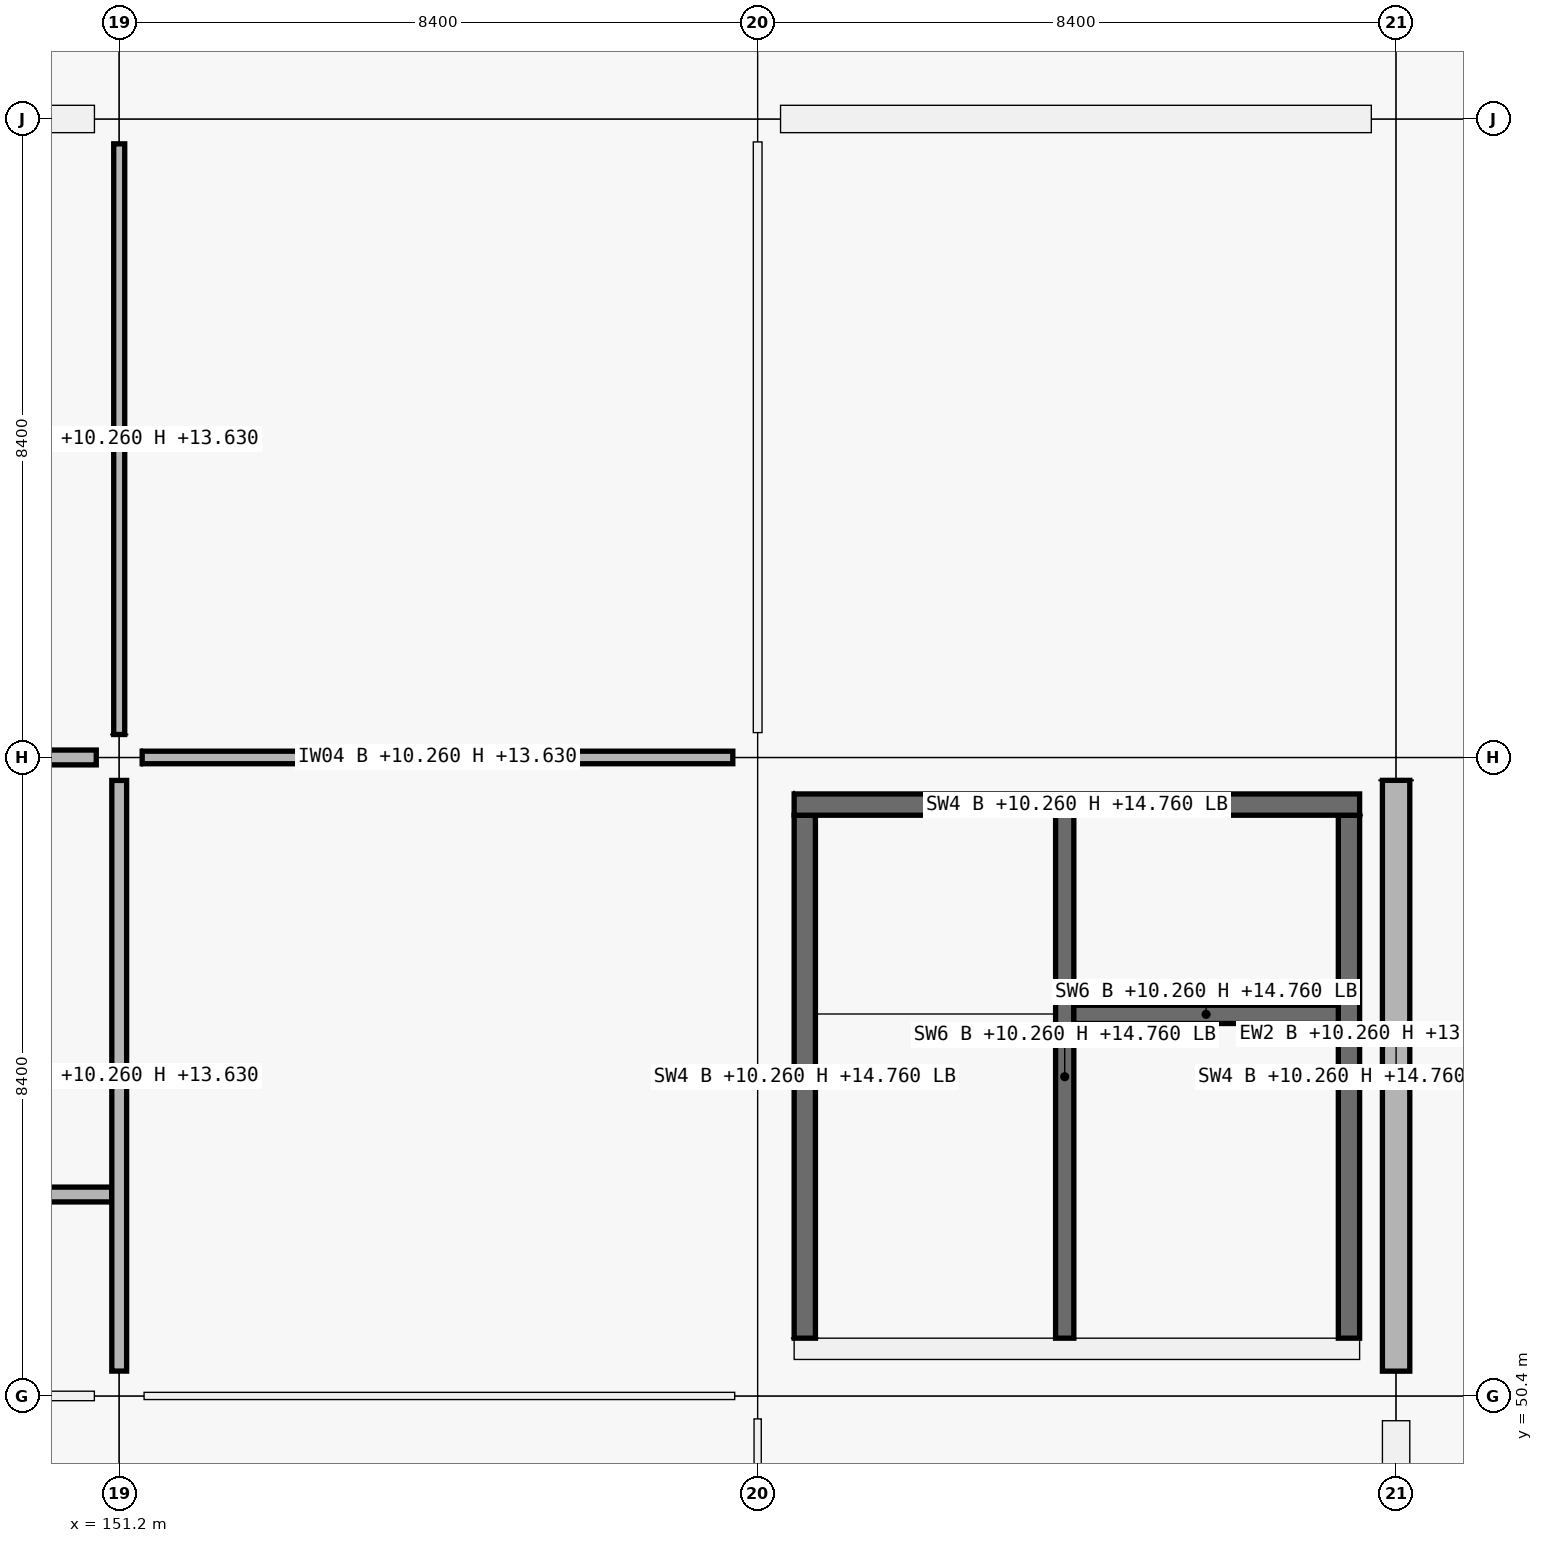
"""IFC4 building model, lengths in metres.
Left out: names, types, materials, properties, quantities, classifications, styles, units other than length and angle.
Written with IfcOpenShell. Run it as: python <this file> out.ifc"""

import sys

from ifc_helpers import new_model, si_unit, direction, frame, frame_2d, origin, origin_2d, place, context, subcontext, project, spatial, rectangle, extrude, element, fill, save


model = new_model("IFC4")
c1 = context("Model", 3, precision=1e-05, world=origin(), true_north=direction((0.0, 1.0)))
c2 = subcontext(c1, "Body", "Model", "MODEL_VIEW")
j1 = project(units=[si_unit("LENGTHUNIT", "METRE"), si_unit("PLANEANGLEUNIT", "RADIAN")], contexts=[c1])
p1 = place(None, origin())
s1 = spatial("IfcSite", under=j1, at=p1, CompositionType="ELEMENT")
p2 = place(p1, origin())
s2 = spatial("IfcBuilding", under=s1, at=p2, CompositionType="ELEMENT")
p3 = place(p2, frame((0.0, 0.0, 10.26)))
s3 = spatial("IfcBuildingStorey", under=s2, at=p3, CompositionType="ELEMENT", Elevation=10.26)
p4 = place(p3, frame((151.2, 50.4, 0.0), z_axis=(0.0, 0.0, 1.0), x_axis=(1.0, 0.0, 0.0)))
e1 = element("IfcColumn", 1, at=p4, inside=s3, PredefinedType="COLUMN", context=c2, shape_type="SweptSolid", body=[
    extrude(rectangle(XDim=0.65, YDim=0.65, at=origin_2d()), origin(), (0.0, 0.0, 1.0), 4.5),
])
p5 = place(p3, frame((151.2, 58.8, 0.0), z_axis=(0.0, 0.0, 1.0), x_axis=(1.0, 0.0, 0.0)))
e2 = element("IfcColumn", 2, at=p5, inside=s3, PredefinedType="COLUMN", context=c2, shape_type="SweptSolid", body=[
    extrude(rectangle(XDim=0.6, YDim=0.6, at=origin_2d()), origin(), (0.0, 0.0, 1.0), 4.5),
])
p6 = place(p3, frame((151.2, 67.2, 0.0), z_axis=(0.0, 0.0, 1.0), x_axis=(1.0, 0.0, 0.0)))
e3 = element("IfcColumn", 3, at=p6, inside=s3, PredefinedType="COLUMN", context=c2, shape_type="SweptSolid", body=[
    extrude(rectangle(XDim=0.65, YDim=0.65, at=origin_2d()), origin(), (0.0, 0.0, 1.0), 4.5),
])
p7 = place(p3, frame((159.6, 50.4, 0.0), z_axis=(0.0, 0.0, 1.0), x_axis=(1.0, 0.0, 0.0)))
e4 = element("IfcColumn", 4, at=p7, inside=s3, PredefinedType="COLUMN", context=c2, shape_type="SweptSolid", body=[
    extrude(rectangle(XDim=0.6, YDim=0.6, at=origin_2d()), origin(), (0.0, 0.0, 1.0), 4.5),
])
p8 = place(p3, frame((159.6, 58.8, 0.0), z_axis=(0.0, 0.0, 1.0), x_axis=(1.0, 0.0, 0.0)))
e5 = element("IfcColumn", 5, at=p8, inside=s3, PredefinedType="COLUMN", context=c2, shape_type="SweptSolid", body=[
    extrude(rectangle(XDim=0.65, YDim=0.65, at=origin_2d()), origin(), (0.0, 0.0, 1.0), 4.5),
])
p9 = place(p3, frame((159.6, 67.2, 0.0), z_axis=(0.0, 0.0, 1.0), x_axis=(1.0, 0.0, 0.0)))
e6 = element("IfcColumn", 6, at=p9, inside=s3, PredefinedType="COLUMN", context=c2, shape_type="SweptSolid", body=[
    extrude(rectangle(XDim=0.6, YDim=0.6, at=origin_2d()), origin(), (0.0, 0.0, 1.0), 4.5),
])
p10 = place(p3, frame((168.0, 50.4, 0.0), z_axis=(0.0, 0.0, 1.0), x_axis=(1.0, 0.0, 0.0)))
e7 = element("IfcColumn", 7, at=p10, inside=s3, PredefinedType="COLUMN", context=c2, shape_type="SweptSolid", body=[
    extrude(rectangle(XDim=0.65, YDim=0.65, at=origin_2d()), origin(), (0.0, 0.0, 1.0), 4.5),
])
p11 = place(p3, frame((168.0, 58.8, 0.0), z_axis=(0.0, 0.0, 1.0), x_axis=(1.0, 0.0, 0.0)))
e8 = element("IfcColumn", 8, at=p11, inside=s3, PredefinedType="COLUMN", context=c2, shape_type="SweptSolid", body=[
    extrude(rectangle(XDim=0.6, YDim=0.6, at=origin_2d()), origin(), (0.0, 0.0, 1.0), 4.5),
])
p12 = place(p3, frame((168.0, 67.2, 0.0), z_axis=(0.0, 0.0, 1.0), x_axis=(1.0, 0.0, 0.0)))
e9 = element("IfcColumn", 9, at=p12, inside=s3, PredefinedType="COLUMN", context=c2, shape_type="SweptSolid", body=[
    extrude(rectangle(XDim=0.65, YDim=0.65, at=origin_2d()), origin(), (0.0, 0.0, 1.0), 4.5),
])
p13 = place(p3, frame((143.101, 67.2, 0.0), z_axis=(0.0, 0.0, 1.0), x_axis=(1.0, 0.0, 0.0)))
e10 = element("IfcWall", 10, at=p13, inside=s3, PredefinedType="SOLIDWALL", context=c2, shape_type="SweptSolid", body=[
    extrude(rectangle(XDim=7.773, YDim=0.36, at=frame_2d((3.886, 0.0))), origin(), (0.0, 0.0, 1.0), 3.54),
])
p14 = place(p13, frame((2.686, 0.0, 0.9)))
e11 = element("IfcOpeningElement", 11, at=p14, cuts=e10, PredefinedType="OPENING", context=c2, shape_type="SweptSolid", body=[
    extrude(rectangle(XDim=2.4, YDim=1.8, at=frame_2d((1.2, 0.9))), frame((0.0, 0.18, 0.0), z_axis=(0.0, -1.0, 0.0), x_axis=(1.0, 0.0, 0.0)), (0.0, 0.0, 1.0), 0.36),
])
p15 = place(p3, frame((168.0, 50.074, 0.0), z_axis=(0.0, 0.0, 1.0), x_axis=(0.0, -1.0, 0.0)))
e12 = element("IfcWall", 12, at=p15, inside=s3, PredefinedType="SOLIDWALL", context=c2, shape_type="SweptSolid", body=[
    extrude(rectangle(XDim=7.773, YDim=0.36, at=frame_2d((3.886, 0.0))), origin(), (0.0, 0.0, 1.0), 3.54),
])
p16 = place(p15, frame((2.587, 0.0, 0.9)))
e13 = element("IfcOpeningElement", 13, at=p16, cuts=e12, PredefinedType="OPENING", context=c2, shape_type="SweptSolid", body=[
    extrude(rectangle(XDim=2.6, YDim=2.1, at=frame_2d((1.3, 1.05))), frame((0.0, 0.18, 0.0), z_axis=(0.0, -1.0, 0.0), x_axis=(1.0, 0.0, 0.0)), (0.0, 0.0, 1.0), 0.36),
])
p17 = place(p3, frame((168.0, 58.499, 0.0), z_axis=(0.0, 0.0, 1.0), x_axis=(0.0, -1.0, 0.0)))
e14 = element("IfcWall", 14, at=p17, inside=s3, PredefinedType="SOLIDWALL", context=c2, shape_type="SweptSolid", body=[
    extrude(rectangle(XDim=7.773, YDim=0.36, at=frame_2d((3.886, 0.0))), origin(), (0.0, 0.0, 1.0), 3.54),
])
p18 = place(p3, frame((159.901, 67.2, 0.0), z_axis=(0.0, 0.0, 1.0), x_axis=(1.0, 0.0, 0.0)))
e15 = element("IfcWall", 15, at=p18, inside=s3, PredefinedType="SOLIDWALL", context=c2, shape_type="SweptSolid", body=[
    extrude(rectangle(XDim=7.773, YDim=0.36, at=frame_2d((3.887, 0.0))), origin(), (0.0, 0.0, 1.0), 3.54),
])
p19 = place(p18, frame((3.286, 0.0, 0.9)))
e16 = element("IfcOpeningElement", 16, at=p19, cuts=e15, PredefinedType="OPENING", context=c2, shape_type="SweptSolid", body=[
    extrude(rectangle(XDim=1.2, YDim=2.1, at=frame_2d((0.6, 1.05))), frame((0.0, 0.18, 0.0), z_axis=(0.0, -1.0, 0.0), x_axis=(1.0, 0.0, 0.0)), (0.0, 0.0, 1.0), 0.36),
])
p20 = place(p3, frame((167.52, 51.02, 0.0), z_axis=(0.0, 0.0, 1.0), x_axis=(-1.0, 0.0, 0.0)))
e17 = element("IfcWall", 17, at=p20, inside=s3, PredefinedType="SHEAR", context=c2, shape_type="SweptSolid", body=[
    extrude(rectangle(XDim=7.44, YDim=0.28, at=frame_2d((3.72, 0.0))), origin(), (0.0, 0.0, 1.0), 4.5),
])
p21 = place(p20, frame((1.28, 0.0, 0.0)))
e18 = element("IfcOpeningElement", 18, at=p21, cuts=e17, PredefinedType="OPENING", context=c2, shape_type="SweptSolid", body=[
    extrude(rectangle(XDim=1.5, YDim=2.15, at=frame_2d((0.75, 1.075))), frame((0.0, 0.14, 0.0), z_axis=(0.0, -1.0, 0.0), x_axis=(1.0, 0.0, 0.0)), (0.0, 0.0, 1.0), 0.28),
])
p22 = place(p3, frame((160.22, 51.16, 0.0), z_axis=(0.0, 0.0, 1.0), x_axis=(0.0, 1.0, 0.0)))
e19 = element("IfcWall", 19, at=p22, inside=s3, PredefinedType="SHEAR", context=c2, shape_type="SweptSolid", body=[
    extrude(rectangle(XDim=6.88, YDim=0.28, at=frame_2d((3.44, 0.0))), origin(), (0.0, 0.0, 1.0), 4.5),
])
p23 = place(p3, frame((160.08, 58.18, 0.0), z_axis=(0.0, 0.0, 1.0), x_axis=(1.0, 0.0, 0.0)))
e20 = element("IfcWall", 20, at=p23, inside=s3, PredefinedType="SHEAR", context=c2, shape_type="SweptSolid", body=[
    extrude(rectangle(XDim=7.44, YDim=0.28, at=frame_2d((3.72, 0.0))), origin(), (0.0, 0.0, 1.0), 4.5),
])
p24 = place(p3, frame((167.38, 58.04, 0.0), z_axis=(0.0, 0.0, 1.0), x_axis=(0.0, -1.0, 0.0)))
e21 = element("IfcWall", 21, at=p24, inside=s3, PredefinedType="SHEAR", context=c2, shape_type="SweptSolid", body=[
    extrude(rectangle(XDim=6.88, YDim=0.28, at=frame_2d((3.44, 0.0))), origin(), (0.0, 0.0, 1.0), 4.5),
])
p25 = place(p3, frame((163.64, 51.16, 0.0), z_axis=(0.0, 0.0, 1.0), x_axis=(0.0, 1.0, 0.0)))
e22 = element("IfcWall", 22, at=p25, inside=s3, PredefinedType="SHEAR", context=c2, shape_type="SweptSolid", body=[
    extrude(rectangle(XDim=6.88, YDim=0.24, at=frame_2d((3.44, 0.0))), origin(), (0.0, 0.0, 1.0), 4.5),
])
p26 = place(p25, frame((0.12, 0.0, 0.0)))
e23 = element("IfcOpeningElement", 23, at=p26, cuts=e22, PredefinedType="OPENING", context=c2, shape_type="SweptSolid", body=[
    extrude(rectangle(XDim=1.0, YDim=2.15, at=frame_2d((0.5, 1.075))), frame((0.0, 0.12, 0.0), z_axis=(0.0, -1.0, 0.0), x_axis=(1.0, 0.0, 0.0)), (0.0, 0.0, 1.0), 0.24),
])
p27 = place(p3, frame((163.76, 55.42, 0.0), z_axis=(0.0, 0.0, 1.0), x_axis=(1.0, 0.0, 0.0)))
e24 = element("IfcWall", 24, at=p27, inside=s3, PredefinedType="SHEAR", context=c2, shape_type="SweptSolid", body=[
    extrude(rectangle(XDim=3.48, YDim=0.24, at=frame_2d((1.74, 0.0))), origin(), (0.0, 0.0, 1.0), 4.5),
])
p28 = place(p27, frame((1.09, 0.0, 0.0)))
e25 = element("IfcOpeningElement", 25, at=p28, cuts=e24, PredefinedType="OPENING", context=c2, shape_type="SweptSolid", body=[
    extrude(rectangle(XDim=1.3, YDim=2.25, at=frame_2d((0.65, 1.125))), frame((0.0, 0.12, 0.0), z_axis=(0.0, -1.0, 0.0), x_axis=(1.0, 0.0, 0.0)), (0.0, 0.0, 1.0), 0.24),
])
p29 = place(p3, frame((143.102, 50.4, 0.0), z_axis=(0.0, 0.0, 1.0), x_axis=(1.0, 0.0, 0.0)))
e26 = element("IfcWall", 26, at=p29, inside=s3, PredefinedType="PARTITIONING", context=c2, shape_type="SweptSolid", body=[
    extrude(rectangle(XDim=7.771, YDim=0.125, at=frame_2d((3.885, 0.0))), origin(), (0.0, 0.0, 1.0), 3.37),
])
p30 = place(p3, frame((143.127, 58.8, 0.0), z_axis=(0.0, 0.0, 1.0), x_axis=(1.0, 0.0, 0.0)))
e27 = element("IfcWall", 27, at=p30, inside=s3, PredefinedType="PARTITIONING", context=c2, shape_type="SweptSolid", body=[
    extrude(rectangle(XDim=7.771, YDim=0.195, at=frame_2d((3.885, 0.0))), origin(), (0.0, 0.0, 1.0), 3.37),
])
p31 = place(p3, frame((151.527, 50.4, 0.0), z_axis=(0.0, 0.0, 1.0), x_axis=(1.0, 0.0, 0.0)))
e28 = element("IfcWall", 28, at=p31, inside=s3, PredefinedType="PARTITIONING", context=c2, shape_type="SweptSolid", body=[
    extrude(rectangle(XDim=7.771, YDim=0.095, at=frame_2d((3.885, 0.0))), origin(), (0.0, 0.0, 1.0), 3.37),
])
p32 = place(p31, frame((3.405, 0.0, 0.0)))
e29 = element("IfcOpeningElement", 29, at=p32, cuts=e28, PredefinedType="OPENING", context=c2, shape_type="SweptSolid", body=[
    extrude(rectangle(XDim=0.96, YDim=2.18, at=frame_2d((0.48, 1.09))), frame((0.0, 0.047, 0.0), z_axis=(0.0, -1.0, 0.0), x_axis=(1.0, 0.0, 0.0)), (0.0, 0.0, 1.0), 0.095),
])
p33 = place(p3, frame((151.502, 58.8, 0.0), z_axis=(0.0, 0.0, 1.0), x_axis=(1.0, 0.0, 0.0)))
e30 = element("IfcWall", 30, at=p33, inside=s3, PredefinedType="PARTITIONING", context=c2, shape_type="SweptSolid", body=[
    extrude(rectangle(XDim=7.771, YDim=0.165, at=frame_2d((3.885, 0.0))), origin(), (0.0, 0.0, 1.0), 3.37),
])
p34 = place(p33, frame((3.415, 0.0, 0.0)))
e31 = element("IfcOpeningElement", 31, at=p34, cuts=e30, PredefinedType="OPENING", context=c2, shape_type="SweptSolid", body=[
    extrude(rectangle(XDim=0.94, YDim=2.15, at=frame_2d((0.47, 1.075))), frame((0.0, 0.083, 0.0), z_axis=(0.0, -1.0, 0.0), x_axis=(1.0, 0.0, 0.0)), (0.0, 0.0, 1.0), 0.165),
])
p35 = place(p3, frame((151.2, 50.727, 0.0), z_axis=(0.0, 0.0, 1.0), x_axis=(0.0, 1.0, 0.0)))
e32 = element("IfcWall", 32, at=p35, inside=s3, PredefinedType="PARTITIONING", context=c2, shape_type="SweptSolid", body=[
    extrude(rectangle(XDim=7.771, YDim=0.195, at=frame_2d((3.885, 0.0))), origin(), (0.0, 0.0, 1.0), 3.37),
])
p36 = place(p3, frame((151.2, 59.102, 0.0), z_axis=(0.0, 0.0, 1.0), x_axis=(0.0, 1.0, 0.0)))
e33 = element("IfcWall", 33, at=p36, inside=s3, PredefinedType="PARTITIONING", context=c2, shape_type="SweptSolid", body=[
    extrude(rectangle(XDim=7.771, YDim=0.145, at=frame_2d((3.885, 0.0))), origin(), (0.0, 0.0, 1.0), 3.37),
])
p37 = place(p36, frame((3.401, 0.0, 0.0)))
e34 = element("IfcOpeningElement", 34, at=p37, cuts=e33, PredefinedType="OPENING", context=c2, shape_type="SweptSolid", body=[
    extrude(rectangle(XDim=0.97, YDim=2.12, at=frame_2d((0.485, 1.06))), frame((0.0, 0.073, 0.0), z_axis=(0.0, -1.0, 0.0), x_axis=(1.0, 0.0, 0.0)), (0.0, 0.0, 1.0), 0.145),
])
p38 = place(p3, frame((159.6, 42.327, 0.0), z_axis=(0.0, 0.0, 1.0), x_axis=(0.0, 1.0, 0.0)))
e35 = element("IfcWall", 35, at=p38, inside=s3, PredefinedType="PARTITIONING", context=c2, shape_type="SweptSolid", body=[
    extrude(rectangle(XDim=7.771, YDim=0.095, at=frame_2d((3.885, 0.0))), origin(), (0.0, 0.0, 1.0), 3.37),
])
p39 = place(p38, frame((3.381, 0.0, 0.0)))
e36 = element("IfcOpeningElement", 36, at=p39, cuts=e35, PredefinedType="OPENING", context=c2, shape_type="SweptSolid", body=[
    extrude(rectangle(XDim=1.01, YDim=2.12, at=frame_2d((0.505, 1.06))), frame((0.0, 0.047, 0.0), z_axis=(0.0, -1.0, 0.0), x_axis=(1.0, 0.0, 0.0)), (0.0, 0.0, 1.0), 0.095),
])
p40 = place(p3, frame((159.6, 59.127, 0.0), z_axis=(0.0, 0.0, 1.0), x_axis=(0.0, 1.0, 0.0)))
e37 = element("IfcWall", 37, at=p40, inside=s3, PredefinedType="PARTITIONING", context=c2, shape_type="SweptSolid", body=[
    extrude(rectangle(XDim=7.771, YDim=0.115, at=frame_2d((3.885, 0.0))), origin(), (0.0, 0.0, 1.0), 3.37),
])
p41 = place(p40, frame((3.365, 0.0, 0.0)))
e38 = element("IfcOpeningElement", 38, at=p41, cuts=e37, PredefinedType="OPENING", context=c2, shape_type="SweptSolid", body=[
    extrude(rectangle(XDim=1.04, YDim=2.2, at=frame_2d((0.52, 1.1))), frame((0.0, 0.058, 0.0), z_axis=(0.0, -1.0, 0.0), x_axis=(1.0, 0.0, 0.0)), (0.0, 0.0, 1.0), 0.115),
])
p42 = place(p3, frame((142.854, 53.05, 0.0), z_axis=(0.0, 0.0, 1.0), x_axis=(1.0, 0.0, 0.0)))
e39 = element("IfcWall", 39, at=p42, inside=s3, PredefinedType="PARTITIONING", context=c2, shape_type="SweptSolid", body=[
    extrude(rectangle(XDim=8.246, YDim=0.195, at=frame_2d((4.123, 0.0))), origin(), (0.0, 0.0, 1.0), 3.37),
])
p43 = place(p19, origin())
e40 = element("IfcWindow", 40, at=p43, inside=s3, PartitioningType="SINGLE_PANEL", PredefinedType="WINDOW", context=c2, shape_type="SweptSolid", body=[
    extrude(rectangle(XDim=1.2, YDim=2.1, at=frame_2d((0.6, 1.05))), frame((0.0, 0.03, 0.0), z_axis=(0.0, -1.0, 0.0), x_axis=(1.0, 0.0, 0.0)), (0.0, 0.0, 1.0), 0.06),
])
fill(e16, e40)
p44 = place(p26, origin())
e41 = element("IfcDoor", 41, at=p44, inside=s3, OperationType="SINGLE_SWING_LEFT", PredefinedType="DOOR", context=c2, shape_type="SweptSolid", body=[
    extrude(rectangle(XDim=1.0, YDim=2.15, at=frame_2d((0.5, 1.075))), frame((0.0, 0.025, 0.0), z_axis=(0.0, -1.0, 0.0), x_axis=(1.0, 0.0, 0.0)), (0.0, 0.0, 1.0), 0.05),
])
fill(e23, e41)
p45 = place(p21, origin())
e42 = element("IfcDoor", 42, at=p45, inside=s3, OperationType="DOUBLE_DOOR_SINGLE_SWING", PredefinedType="DOOR", context=c2, shape_type="SweptSolid", body=[
    extrude(rectangle(XDim=1.5, YDim=2.15, at=frame_2d((0.75, 1.075))), frame((0.0, 0.025, 0.0), z_axis=(0.0, -1.0, 0.0), x_axis=(1.0, 0.0, 0.0)), (0.0, 0.0, 1.0), 0.05),
])
fill(e18, e42)
p46 = place(p28, origin())
e43 = element("IfcDoor", 43, at=p46, inside=s3, OperationType="DOUBLE_DOOR_SLIDING", PredefinedType="DOOR", context=c2, shape_type="SweptSolid", body=[
    extrude(rectangle(XDim=1.3, YDim=2.25, at=frame_2d((0.65, 1.125))), frame((0.0, 0.025, 0.0), z_axis=(0.0, -1.0, 0.0), x_axis=(1.0, 0.0, 0.0)), (0.0, 0.0, 1.0), 0.05),
])
fill(e25, e43)
p47 = place(p32, origin())
e44 = element("IfcDoor", 44, at=p47, inside=s3, OperationType="SINGLE_SWING_RIGHT", PredefinedType="DOOR", context=c2, shape_type="SweptSolid", body=[
    extrude(rectangle(XDim=0.96, YDim=2.18, at=frame_2d((0.48, 1.09))), frame((0.0, 0.025, 0.0), z_axis=(0.0, -1.0, 0.0), x_axis=(1.0, 0.0, 0.0)), (0.0, 0.0, 1.0), 0.05),
])
fill(e29, e44)
p48 = place(p34, origin())
e45 = element("IfcDoor", 45, at=p48, inside=s3, OperationType="SINGLE_SWING_LEFT", PredefinedType="DOOR", context=c2, shape_type="SweptSolid", body=[
    extrude(rectangle(XDim=0.94, YDim=2.15, at=frame_2d((0.47, 1.075))), frame((0.0, 0.025, 0.0), z_axis=(0.0, -1.0, 0.0), x_axis=(1.0, 0.0, 0.0)), (0.0, 0.0, 1.0), 0.05),
])
fill(e31, e45)
p49 = place(p41, origin())
e46 = element("IfcDoor", 46, at=p49, inside=s3, OperationType="SINGLE_SWING_LEFT", PredefinedType="DOOR", context=c2, shape_type="SweptSolid", body=[
    extrude(rectangle(XDim=1.04, YDim=2.2, at=frame_2d((0.52, 1.1))), frame((0.0, 0.025, 0.0), z_axis=(0.0, -1.0, 0.0), x_axis=(1.0, 0.0, 0.0)), (0.0, 0.0, 1.0), 0.05),
])
fill(e38, e46)
p50 = place(p37, origin())
e47 = element("IfcDoor", 47, at=p50, inside=s3, OperationType="SINGLE_SWING_LEFT", PredefinedType="DOOR", context=c2, shape_type="SweptSolid", body=[
    extrude(rectangle(XDim=0.97, YDim=2.12, at=frame_2d((0.485, 1.06))), frame((0.0, 0.025, 0.0), z_axis=(0.0, -1.0, 0.0), x_axis=(1.0, 0.0, 0.0)), (0.0, 0.0, 1.0), 0.05),
])
fill(e34, e47)
save(model, sys.argv[1])
